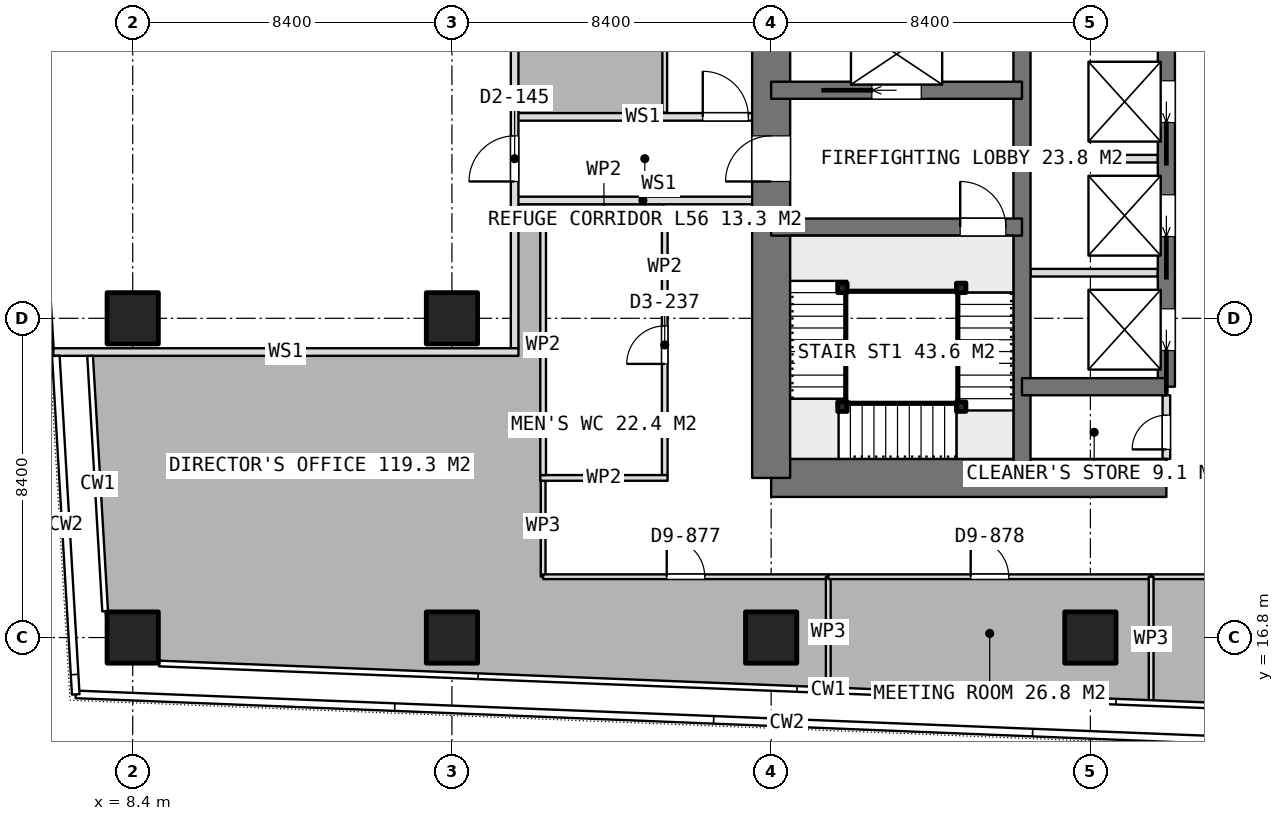
"""IFC4 building model, lengths in metres.
Left out: names, types, materials, properties, quantities, classifications, styles, units other than length and angle.
Written with IfcOpenShell. Run it as: python <this file> out.ifc"""

import sys

from ifc_helpers import new_model, si_unit, direction, frame, frame_2d, origin, origin_2d, place, context, subcontext, project, spatial, rectangle, extrude, element, fill, save


model = new_model("IFC4")
c1 = context("Model", 3, precision=1e-05, world=origin(), true_north=direction((0.0, 1.0)))
c2 = subcontext(c1, "Body", "Model", "MODEL_VIEW")
j1 = project(units=[si_unit("LENGTHUNIT", "METRE"), si_unit("PLANEANGLEUNIT", "RADIAN")], contexts=[c1])
p1 = place(None, origin())
s1 = spatial("IfcSite", under=j1, at=p1, CompositionType="ELEMENT")
p2 = place(p1, origin())
s2 = spatial("IfcBuilding", under=s1, at=p2, CompositionType="ELEMENT")
p3 = place(p2, frame((0.0, 0.0, 221.45)))
s3 = spatial("IfcBuildingStorey", under=s2, at=p3, CompositionType="ELEMENT", Elevation=221.45)
p4 = place(p3, frame((25.2, 21.0, 0.0), z_axis=(0.0, 0.0, 1.0), x_axis=(1.0, 0.0, 0.0)))
e1 = element("IfcWall", 1, at=p4, inside=s3, PredefinedType="SHEAR", context=c2, shape_type="SweptSolid", body=[
    extrude(rectangle(XDim=10.4, YDim=1.0, at=frame_2d((5.2, 0.0))), origin(), (0.0, 0.0, 1.0), 3.75),
])
p5 = place(p3, frame((25.2, 21.0, 0.0), z_axis=(0.0, 0.0, 1.0), x_axis=(0.0, 1.0, 0.0)))
e2 = element("IfcWall", 2, at=p5, inside=s3, PredefinedType="SHEAR", context=c2, shape_type="SweptSolid", body=[
    extrude(rectangle(XDim=25.2, YDim=1.0, at=frame_2d((12.6, 0.0))), origin(), (0.0, 0.0, 1.0), 3.75),
])
p6 = place(p5, frame((7.8, 0.0, 0.0)))
e3 = element("IfcOpeningElement", 3, at=p6, cuts=e2, PredefinedType="OPENING", context=c2, shape_type="SweptSolid", body=[
    extrude(rectangle(XDim=1.2, YDim=2.1, at=frame_2d((0.6, 1.05))), frame((0.0, 0.51, 0.0), z_axis=(0.0, -1.0, 0.0), x_axis=(1.0, 0.0, 0.0)), (0.0, 0.0, 1.0), 1.02),
])
p7 = place(p5, frame((14.25, 0.0, 0.0)))
e4 = element("IfcOpeningElement", 4, at=p7, cuts=e2, PredefinedType="OPENING", context=c2, shape_type="SweptSolid", body=[
    extrude(rectangle(XDim=0.9, YDim=2.1, at=frame_2d((0.45, 1.05))), frame((0.0, 0.51, 0.0), z_axis=(0.0, -1.0, 0.0), x_axis=(1.0, 0.0, 0.0)), (0.0, 0.0, 1.0), 1.02),
])
p8 = place(p5, frame((16.85, 0.0, 0.0)))
e5 = element("IfcOpeningElement", 5, at=p8, cuts=e2, PredefinedType="OPENING", context=c2, shape_type="SweptSolid", body=[
    extrude(rectangle(XDim=0.9, YDim=2.1, at=frame_2d((0.45, 1.05))), frame((0.0, 0.51, 0.0), z_axis=(0.0, -1.0, 0.0), x_axis=(1.0, 0.0, 0.0)), (0.0, 0.0, 1.0), 1.02),
])
p9 = place(p5, frame((19.025, 0.0, 0.0)))
e6 = element("IfcOpeningElement", 6, at=p9, cuts=e2, PredefinedType="OPENING", context=c2, shape_type="SweptSolid", body=[
    extrude(rectangle(XDim=1.2, YDim=2.1, at=frame_2d((0.6, 1.05))), frame((0.0, 0.51, 0.0), z_axis=(0.0, -1.0, 0.0), x_axis=(1.0, 0.0, 0.0)), (0.0, 0.0, 1.0), 1.02),
])
p10 = place(p3, frame((31.8, 21.0, 0.0), z_axis=(0.0, 0.0, 1.0), x_axis=(0.0, 1.0, 0.0)))
e7 = element("IfcWall", 7, at=p10, inside=s3, PredefinedType="SHEAR", context=c2, shape_type="SweptSolid", body=[
    extrude(rectangle(XDim=25.2, YDim=0.45, at=frame_2d((12.6, 0.0))), origin(), (0.0, 0.0, 1.0), 3.75),
])
p11 = place(p3, frame((35.6, 23.4, 0.0), z_axis=(0.0, 0.0, 1.0), x_axis=(0.0, 1.0, 0.0)))
e8 = element("IfcWall", 8, at=p11, inside=s3, PredefinedType="SHEAR", context=c2, shape_type="SweptSolid", body=[
    extrude(rectangle(XDim=18.0, YDim=0.45, at=frame_2d((9.0, 0.0))), origin(), (0.0, 0.0, 1.0), 3.75),
])
p12 = place(p11, frame((0.95, 0.0, 0.0)))
e9 = element("IfcOpeningElement", 9, at=p12, cuts=e8, PredefinedType="OPENING", context=c2, shape_type="SweptSolid", body=[
    extrude(rectangle(XDim=1.1, YDim=2.1, at=frame_2d((0.55, 1.05))), frame((0.0, 0.235, 0.0), z_axis=(0.0, -1.0, 0.0), x_axis=(1.0, 0.0, 0.0)), (0.0, 0.0, 1.0), 0.47),
])
p13 = place(p11, frame((3.95, 0.0, 0.0)))
e10 = element("IfcOpeningElement", 10, at=p13, cuts=e8, PredefinedType="OPENING", context=c2, shape_type="SweptSolid", body=[
    extrude(rectangle(XDim=1.1, YDim=2.1, at=frame_2d((0.55, 1.05))), frame((0.0, 0.235, 0.0), z_axis=(0.0, -1.0, 0.0), x_axis=(1.0, 0.0, 0.0)), (0.0, 0.0, 1.0), 0.47),
])
p14 = place(p11, frame((6.95, 0.0, 0.0)))
e11 = element("IfcOpeningElement", 11, at=p14, cuts=e8, PredefinedType="OPENING", context=c2, shape_type="SweptSolid", body=[
    extrude(rectangle(XDim=1.1, YDim=2.1, at=frame_2d((0.55, 1.05))), frame((0.0, 0.235, 0.0), z_axis=(0.0, -1.0, 0.0), x_axis=(1.0, 0.0, 0.0)), (0.0, 0.0, 1.0), 0.47),
])
p15 = place(p11, frame((9.95, 0.0, 0.0)))
e12 = element("IfcOpeningElement", 12, at=p15, cuts=e8, PredefinedType="OPENING", context=c2, shape_type="SweptSolid", body=[
    extrude(rectangle(XDim=1.1, YDim=2.1, at=frame_2d((0.55, 1.05))), frame((0.0, 0.235, 0.0), z_axis=(0.0, -1.0, 0.0), x_axis=(1.0, 0.0, 0.0)), (0.0, 0.0, 1.0), 0.47),
])
p16 = place(p11, frame((12.95, 0.0, 0.0)))
e13 = element("IfcOpeningElement", 13, at=p16, cuts=e8, PredefinedType="OPENING", context=c2, shape_type="SweptSolid", body=[
    extrude(rectangle(XDim=1.1, YDim=2.1, at=frame_2d((0.55, 1.05))), frame((0.0, 0.235, 0.0), z_axis=(0.0, -1.0, 0.0), x_axis=(1.0, 0.0, 0.0)), (0.0, 0.0, 1.0), 0.47),
])
p17 = place(p11, frame((15.95, 0.0, 0.0)))
e14 = element("IfcOpeningElement", 14, at=p17, cuts=e8, PredefinedType="OPENING", context=c2, shape_type="SweptSolid", body=[
    extrude(rectangle(XDim=1.1, YDim=2.1, at=frame_2d((0.55, 1.05))), frame((0.0, 0.235, 0.0), z_axis=(0.0, -1.0, 0.0), x_axis=(1.0, 0.0, 0.0)), (0.0, 0.0, 1.0), 0.47),
])
p18 = place(p3, frame((31.8, 23.4, 0.0), z_axis=(0.0, 0.0, 1.0), x_axis=(1.0, 0.0, 0.0)))
e15 = element("IfcWall", 15, at=p18, inside=s3, PredefinedType="SHEAR", context=c2, shape_type="SweptSolid", body=[
    extrude(rectangle(XDim=3.8, YDim=0.45, at=frame_2d((1.9, 0.0))), origin(), (0.0, 0.0, 1.0), 3.75),
])
p19 = place(p3, frame((25.2, 27.6, 0.0), z_axis=(0.0, 0.0, 1.0), x_axis=(1.0, 0.0, 0.0)))
e16 = element("IfcWall", 16, at=p19, inside=s3, PredefinedType="SHEAR", context=c2, shape_type="SweptSolid", body=[
    extrude(rectangle(XDim=6.6, YDim=0.45, at=frame_2d((3.3, 0.0))), origin(), (0.0, 0.0, 1.0), 3.75),
])
p20 = place(p19, frame((4.975, 0.0, 0.0)))
e17 = element("IfcOpeningElement", 17, at=p20, cuts=e16, PredefinedType="OPENING", context=c2, shape_type="SweptSolid", body=[
    extrude(rectangle(XDim=1.2, YDim=2.1, at=frame_2d((0.6, 1.05))), frame((0.0, 0.235, 0.0), z_axis=(0.0, -1.0, 0.0), x_axis=(1.0, 0.0, 0.0)), (0.0, 0.0, 1.0), 0.47),
])
p21 = place(p3, frame((25.2, 31.2, 0.0), z_axis=(0.0, 0.0, 1.0), x_axis=(1.0, 0.0, 0.0)))
e18 = element("IfcWall", 18, at=p21, inside=s3, PredefinedType="SHEAR", context=c2, shape_type="SweptSolid", body=[
    extrude(rectangle(XDim=6.6, YDim=0.45, at=frame_2d((3.3, 0.0))), origin(), (0.0, 0.0, 1.0), 3.75),
])
p22 = place(p21, frame((2.65, 0.0, 0.0)))
e19 = element("IfcOpeningElement", 19, at=p22, cuts=e18, PredefinedType="OPENING", context=c2, shape_type="SweptSolid", body=[
    extrude(rectangle(XDim=1.3, YDim=2.1, at=frame_2d((0.65, 1.05))), frame((0.0, 0.235, 0.0), z_axis=(0.0, -1.0, 0.0), x_axis=(1.0, 0.0, 0.0)), (0.0, 0.0, 1.0), 0.47),
])
for number, where, z_axis, x_axis in (
    (20, (8.4, 16.8, 0.0), (0.0, 0.0, 1.0), (1.0, 0.0, 0.0)),
    (21, (8.4, 25.2, 0.0), (0.0, 0.0, 1.0), (1.0, 0.0, 0.0)),
    (22, (16.8, 16.8, 0.0), (0.0, 0.0, 1.0), (1.0, 0.0, 0.0)),
    (23, (16.8, 25.2, 0.0), (0.0, 0.0, 1.0), (1.0, 0.0, 0.0)),
    (24, (25.2, 16.8, 0.0), (0.0, 0.0, 1.0), (1.0, 0.0, 0.0)),
    (25, (33.6, 16.8, 0.0), (0.0, 0.0, 1.0), (1.0, 0.0, 0.0)),
):
    element("IfcColumn", number, at=place(p3, frame(where, z_axis=z_axis, x_axis=x_axis)), inside=s3, PredefinedType="COLUMN", context=c2, shape_type="SweptSolid", body=[
        extrude(rectangle(XDim=1.35, YDim=1.35, at=origin_2d()), origin(), (0.0, 0.0, 1.0), 3.75),
    ])
for number, where, z_axis, x_axis in (
    (26, (32.025, 26.4, 0.0), (0.0, 0.0, 1.0), (1.0, 0.0, 0.0)),
    (27, (32.025, 29.4, 0.0), (0.0, 0.0, 1.0), (1.0, 0.0, 0.0)),
):
    element("IfcWall", number, at=place(p3, frame(where, z_axis=z_axis, x_axis=x_axis)), inside=s3, PredefinedType="PARTITIONING", context=c2, shape_type="SweptSolid", body=[
        extrude(rectangle(XDim=3.35, YDim=0.2, at=frame_2d((1.675, 0.0))), origin(), (0.0, 0.0, 1.0), 3.5),
    ])
p23 = place(p3, frame((35.6, 21.5, 0.0), z_axis=(0.0, 0.0, 1.0), x_axis=(0.0, 1.0, 0.0)))
e28 = element("IfcWall", 28, at=p23, inside=s3, PredefinedType="PARTITIONING", context=c2, shape_type="SweptSolid", body=[
    extrude(rectangle(XDim=1.675, YDim=0.2, at=frame_2d((0.837, 0.0))), origin(), (0.0, 0.0, 1.0), 3.5),
])
p24 = place(p23, frame((0.25, 0.0, 0.0)))
e29 = element("IfcOpeningElement", 29, at=p24, cuts=e28, PredefinedType="OPENING", context=c2, shape_type="SweptSolid", body=[
    extrude(rectangle(XDim=0.9, YDim=2.1, at=frame_2d((0.45, 1.05))), frame((0.0, 0.11, 0.0), z_axis=(0.0, -1.0, 0.0), x_axis=(1.0, 0.0, 0.0)), (0.0, 0.0, 1.0), 0.22),
])
for number, where, z_axis, x_axis in (
    (30, (19.125, 21.0, 0.0), (0.0, 0.0, 1.0), (1.0, 0.0, 0.0)),
    (31, (19.125, 28.0, 0.0), (0.0, 0.0, 1.0), (1.0, 0.0, 0.0)),
):
    element("IfcWall", number, at=place(p3, frame(where, z_axis=z_axis, x_axis=x_axis)), inside=s3, PredefinedType="PARTITIONING", context=c2, shape_type="SweptSolid", body=[
        extrude(rectangle(XDim=3.35, YDim=0.15, at=frame_2d((1.675, 0.0))), origin(), (0.0, 0.0, 1.0), 3.5),
    ])
p25 = place(p3, frame((19.2, 21.075, 0.0), z_axis=(0.0, 0.0, 1.0), x_axis=(0.0, 1.0, 0.0)))
e32 = element("IfcWall", 32, at=p25, inside=s3, PredefinedType="PARTITIONING", context=c2, shape_type="SweptSolid", body=[
    extrude(rectangle(XDim=6.85, YDim=0.15, at=frame_2d((3.425, 0.0))), origin(), (0.0, 0.0, 1.0), 3.5),
])
p26 = place(p3, frame((22.4, 21.075, 0.0), z_axis=(0.0, 0.0, 1.0), x_axis=(0.0, 1.0, 0.0)))
e33 = element("IfcWall", 33, at=p26, inside=s3, PredefinedType="PARTITIONING", context=c2, shape_type="SweptSolid", body=[
    extrude(rectangle(XDim=6.85, YDim=0.15, at=frame_2d((3.425, 0.0))), origin(), (0.0, 0.0, 1.0), 3.5),
])
p27 = place(p26, frame((2.925, 0.0, 0.0)))
e34 = element("IfcOpeningElement", 34, at=p27, cuts=e33, PredefinedType="OPENING", context=c2, shape_type="SweptSolid", body=[
    extrude(rectangle(XDim=1.0, YDim=2.1, at=frame_2d((0.5, 1.05))), frame((0.0, 0.085, 0.0), z_axis=(0.0, -1.0, 0.0), x_axis=(1.0, 0.0, 0.0)), (0.0, 0.0, 1.0), 0.17),
])
p28 = place(p3, frame((35.199, 18.4, 0.0), z_axis=(0.0, 0.0, 1.0), x_axis=(1.0, 0.0, 0.0)))
e35 = element("IfcWall", 35, at=p28, inside=s3, PredefinedType="PARTITIONING", context=c2, shape_type="SweptSolid", body=[
    extrude(rectangle(XDim=15.21, YDim=0.125, at=frame_2d((7.605, 0.0))), origin(), (0.0, 0.0, 1.0), 3.5),
])
p29 = place(p28, frame((7.605, 0.0, 0.0)))
e36 = element("IfcOpeningElement", 36, at=p29, cuts=e35, PredefinedType="OPENING", context=c2, shape_type="SweptSolid", body=[
    extrude(rectangle(XDim=1.8, YDim=2.1, at=frame_2d((0.9, 1.05))), frame((0.0, 0.073, 0.0), z_axis=(0.0, -1.0, 0.0), x_axis=(1.0, 0.0, 0.0)), (0.0, 0.0, 1.0), 0.145),
])
p30 = place(p3, frame((35.199, 15.126, 0.0), z_axis=(0.0, 0.0, 1.0), x_axis=(0.0, 1.0, 0.0)))
e37 = element("IfcWall", 37, at=p30, inside=s3, PredefinedType="PARTITIONING", context=c2, shape_type="SweptSolid", body=[
    extrude(rectangle(XDim=3.274, YDim=0.125, at=frame_2d((1.637, 0.0))), origin(), (0.0, 0.0, 1.0), 3.5),
])
p31 = place(p3, frame((19.2, 21.075, 0.0), z_axis=(0.0, 0.0, 1.0), x_axis=(0.0, -1.0, 0.0)))
e38 = element("IfcWall", 38, at=p31, inside=s3, PredefinedType="PARTITIONING", context=c2, shape_type="SweptSolid", body=[
    extrude(rectangle(XDim=2.675, YDim=0.125, at=frame_2d((1.337, 0.0))), origin(), (0.0, 0.0, 1.0), 3.5),
])
p32 = place(p3, frame((19.2, 18.4, 0.0), z_axis=(0.0, 0.0, 1.0), x_axis=(1.0, 0.0, 0.0)))
e39 = element("IfcWall", 39, at=p32, inside=s3, PredefinedType="PARTITIONING", context=c2, shape_type="SweptSolid", body=[
    extrude(rectangle(XDim=7.503, YDim=0.125, at=frame_2d((3.751, 0.0))), origin(), (0.0, 0.0, 1.0), 3.5),
])
p33 = place(p32, frame((3.252, 0.0, 0.0)))
e40 = element("IfcOpeningElement", 40, at=p33, cuts=e39, PredefinedType="OPENING", context=c2, shape_type="SweptSolid", body=[
    extrude(rectangle(XDim=1.0, YDim=2.1, at=frame_2d((0.5, 1.05))), frame((0.0, 0.073, 0.0), z_axis=(0.0, -1.0, 0.0), x_axis=(1.0, 0.0, 0.0)), (0.0, 0.0, 1.0), 0.145),
])
p34 = place(p3, frame((26.703, 18.4, 0.0), z_axis=(0.0, 0.0, 1.0), x_axis=(0.0, -1.0, 0.0)))
e41 = element("IfcWall", 41, at=p34, inside=s3, PredefinedType="PARTITIONING", context=c2, shape_type="SweptSolid", body=[
    extrude(rectangle(XDim=2.905, YDim=0.125, at=frame_2d((1.452, 0.0))), origin(), (0.0, 0.0, 1.0), 3.5),
])
p35 = place(p3, frame((26.704, 18.4, 0.0), z_axis=(0.0, 0.0, 1.0), x_axis=(1.0, 0.0, 0.0)))
e42 = element("IfcWall", 42, at=p35, inside=s3, PredefinedType="PARTITIONING", context=c2, shape_type="SweptSolid", body=[
    extrude(rectangle(XDim=8.494, YDim=0.125, at=frame_2d((4.247, 0.0))), origin(), (0.0, 0.0, 1.0), 3.5),
])
p36 = place(p35, frame((3.747, 0.0, 0.0)))
e43 = element("IfcOpeningElement", 43, at=p36, cuts=e42, PredefinedType="OPENING", context=c2, shape_type="SweptSolid", body=[
    extrude(rectangle(XDim=1.0, YDim=2.1, at=frame_2d((0.5, 1.05))), frame((0.0, 0.073, 0.0), z_axis=(0.0, -1.0, 0.0), x_axis=(1.0, 0.0, 0.0)), (0.0, 0.0, 1.0), 0.145),
])
p37 = place(p3, frame((22.4, 42.46, 0.0), z_axis=(0.0, 0.0, 1.0), x_axis=(0.0, -1.0, 0.0)))
e44 = element("IfcWall", 44, at=p37, inside=s3, PredefinedType="PARTITIONING", context=c2, shape_type="SweptSolid", body=[
    extrude(rectangle(XDim=11.849, YDim=0.125, at=frame_2d((5.924, 0.0))), origin(), (0.0, 0.0, 1.0), 3.5),
])
p38 = place(p37, frame((4.955, 0.0, 0.0)))
e45 = element("IfcOpeningElement", 45, at=p38, cuts=e44, PredefinedType="OPENING", context=c2, shape_type="SweptSolid", body=[
    extrude(rectangle(XDim=1.8, YDim=2.1, at=frame_2d((0.9, 1.05))), frame((0.0, 0.073, 0.0), z_axis=(0.0, -1.0, 0.0), x_axis=(1.0, 0.0, 0.0)), (0.0, 0.0, 1.0), 0.145),
])
for number, where, z_axis, x_axis in (
    (46, (30.2, 26.0, 0.0), (0.0, 0.0, 1.0), (1.0, 0.0, 0.0)),
    (47, (30.2, 22.875, 0.0), (0.0, 0.0, 1.0), (1.0, 0.0, 0.0)),
    (48, (27.075, 22.875, 0.0), (0.0, 0.0, 1.0), (1.0, 0.0, 0.0)),
    (49, (27.075, 26.0, 0.0), (0.0, 0.0, 1.0), (1.0, 0.0, 0.0)),
):
    element("IfcColumn", number, at=place(p3, frame(where, z_axis=z_axis, x_axis=x_axis)), inside=s3, PredefinedType="COLUMN", context=c2, shape_type="SweptSolid", body=[
        extrude(rectangle(XDim=0.25, YDim=0.25, at=origin_2d()), origin(), (0.0, 0.0, 1.0), 3.75),
    ])
p39 = place(p3, frame((18.45, 24.412, 0.0), z_axis=(0.0, 0.0, 1.0), x_axis=(0.0, 1.0, 0.0)))
e50 = element("IfcWall", 50, at=p39, inside=s3, PredefinedType="PARTITIONING", context=c2, shape_type="SweptSolid", body=[
    extrude(rectangle(XDim=17.816, YDim=0.2, at=frame_2d((8.908, 0.0))), origin(), (0.0, 0.0, 1.0), 3.5),
])
p40 = place(p39, frame((4.388, 0.0, 0.0)))
e51 = element("IfcOpeningElement", 51, at=p40, cuts=e50, PredefinedType="OPENING", context=c2, shape_type="SweptSolid", body=[
    extrude(rectangle(XDim=1.2, YDim=2.1, at=frame_2d((0.6, 1.05))), frame((0.0, 0.11, 0.0), z_axis=(0.0, -1.0, 0.0), x_axis=(1.0, 0.0, 0.0)), (0.0, 0.0, 1.0), 0.22),
])
p41 = place(p3, frame((6.311, 24.312, 0.0), z_axis=(0.0, 0.0, 1.0), x_axis=(1.0, 0.0, 0.0)))
e52 = element("IfcWall", 52, at=p41, inside=s3, PredefinedType="PARTITIONING", context=c2, shape_type="SweptSolid", body=[
    extrude(rectangle(XDim=12.239, YDim=0.2, at=frame_2d((6.12, 0.0))), origin(), (0.0, 0.0, 1.0), 3.5),
])
p42 = place(p3, frame((18.45, 30.5, 0.0), z_axis=(0.0, 0.0, 1.0), x_axis=(1.0, 0.0, 0.0)))
e53 = element("IfcWall", 53, at=p42, inside=s3, PredefinedType="PARTITIONING", context=c2, shape_type="SweptSolid", body=[
    extrude(rectangle(XDim=6.75, YDim=0.2, at=frame_2d((3.375, 0.0))), origin(), (0.0, 0.0, 1.0), 3.5),
])
p43 = place(p42, frame((4.95, 0.0, 0.0)))
e54 = element("IfcOpeningElement", 54, at=p43, cuts=e53, PredefinedType="OPENING", context=c2, shape_type="SweptSolid", body=[
    extrude(rectangle(XDim=1.2, YDim=2.1, at=frame_2d((0.6, 1.05))), frame((0.0, 0.11, 0.0), z_axis=(0.0, -1.0, 0.0), x_axis=(1.0, 0.0, 0.0)), (0.0, 0.0, 1.0), 0.22),
])
p44 = place(p3, frame((18.45, 28.3, 0.0), z_axis=(0.0, 0.0, 1.0), x_axis=(1.0, 0.0, 0.0)))
e55 = element("IfcWall", 55, at=p44, inside=s3, PredefinedType="PARTITIONING", context=c2, shape_type="SweptSolid", body=[
    extrude(rectangle(XDim=6.75, YDim=0.2, at=frame_2d((3.375, 0.0))), origin(), (0.0, 0.0, 1.0), 3.5),
])
p45 = place(p6, origin())
e56 = element("IfcDoor", 56, at=p45, inside=s3, OperationType="SINGLE_SWING_LEFT", PredefinedType="DOOR", context=c2, shape_type="SweptSolid", body=[
    extrude(rectangle(XDim=1.2, YDim=2.1, at=frame_2d((0.6, 1.05))), frame((0.0, 0.025, 0.0), z_axis=(0.0, -1.0, 0.0), x_axis=(1.0, 0.0, 0.0)), (0.0, 0.0, 1.0), 0.05),
])
fill(e3, e56)
p46 = place(p24, origin())
e57 = element("IfcDoor", 57, at=p46, inside=s3, OperationType="SINGLE_SWING_LEFT", PredefinedType="DOOR", context=c2, shape_type="SweptSolid", body=[
    extrude(rectangle(XDim=0.9, YDim=2.1, at=frame_2d((0.45, 1.05))), frame((0.0, 0.025, 0.0), z_axis=(0.0, -1.0, 0.0), x_axis=(1.0, 0.0, 0.0)), (0.0, 0.0, 1.0), 0.05),
])
fill(e29, e57)
p47 = place(p12, origin())
e58 = element("IfcDoor", 58, at=p47, inside=s3, OperationType="SLIDING_TO_LEFT", PredefinedType="USERDEFINED", context=c2, shape_type="SweptSolid", body=[
    extrude(rectangle(XDim=1.1, YDim=2.1, at=frame_2d((0.55, 1.05))), frame((0.0, 0.025, 0.0), z_axis=(0.0, -1.0, 0.0), x_axis=(1.0, 0.0, 0.0)), (0.0, 0.0, 1.0), 0.05),
])
fill(e9, e58)
p48 = place(p13, origin())
e59 = element("IfcDoor", 59, at=p48, inside=s3, OperationType="SLIDING_TO_LEFT", PredefinedType="USERDEFINED", context=c2, shape_type="SweptSolid", body=[
    extrude(rectangle(XDim=1.1, YDim=2.1, at=frame_2d((0.55, 1.05))), frame((0.0, 0.025, 0.0), z_axis=(0.0, -1.0, 0.0), x_axis=(1.0, 0.0, 0.0)), (0.0, 0.0, 1.0), 0.05),
])
fill(e10, e59)
p49 = place(p14, origin())
e60 = element("IfcDoor", 60, at=p49, inside=s3, OperationType="SLIDING_TO_LEFT", PredefinedType="USERDEFINED", context=c2, shape_type="SweptSolid", body=[
    extrude(rectangle(XDim=1.1, YDim=2.1, at=frame_2d((0.55, 1.05))), frame((0.0, 0.025, 0.0), z_axis=(0.0, -1.0, 0.0), x_axis=(1.0, 0.0, 0.0)), (0.0, 0.0, 1.0), 0.05),
])
fill(e11, e60)
p50 = place(p22, origin())
e61 = element("IfcDoor", 61, at=p50, inside=s3, OperationType="SLIDING_TO_LEFT", PredefinedType="USERDEFINED", context=c2, shape_type="SweptSolid", body=[
    extrude(rectangle(XDim=1.3, YDim=2.1, at=frame_2d((0.65, 1.05))), frame((0.0, 0.025, 0.0), z_axis=(0.0, -1.0, 0.0), x_axis=(1.0, 0.0, 0.0)), (0.0, 0.0, 1.0), 0.05),
])
fill(e19, e61)
p51 = place(p27, origin())
e62 = element("IfcDoor", 62, at=p51, inside=s3, OperationType="SINGLE_SWING_LEFT", PredefinedType="DOOR", context=c2, shape_type="SweptSolid", body=[
    extrude(rectangle(XDim=1.0, YDim=2.1, at=frame_2d((0.5, 1.05))), frame((0.0, 0.025, 0.0), z_axis=(0.0, -1.0, 0.0), x_axis=(1.0, 0.0, 0.0)), (0.0, 0.0, 1.0), 0.05),
])
fill(e34, e62)
p52 = place(p33, origin())
e63 = element("IfcDoor", 63, at=p52, inside=s3, OperationType="SINGLE_SWING_LEFT", PredefinedType="DOOR", context=c2, shape_type="SweptSolid", body=[
    extrude(rectangle(XDim=1.0, YDim=2.1, at=frame_2d((0.5, 1.05))), frame((0.0, 0.025, 0.0), z_axis=(0.0, -1.0, 0.0), x_axis=(1.0, 0.0, 0.0)), (0.0, 0.0, 1.0), 0.05),
])
fill(e40, e63)
p53 = place(p36, origin())
e64 = element("IfcDoor", 64, at=p53, inside=s3, OperationType="SINGLE_SWING_LEFT", PredefinedType="DOOR", context=c2, shape_type="SweptSolid", body=[
    extrude(rectangle(XDim=1.0, YDim=2.1, at=frame_2d((0.5, 1.05))), frame((0.0, 0.025, 0.0), z_axis=(0.0, -1.0, 0.0), x_axis=(1.0, 0.0, 0.0)), (0.0, 0.0, 1.0), 0.05),
])
fill(e43, e64)
p54 = place(p20, origin())
e65 = element("IfcDoor", 65, at=p54, inside=s3, OperationType="SINGLE_SWING_RIGHT", PredefinedType="DOOR", context=c2, shape_type="SweptSolid", body=[
    extrude(rectangle(XDim=1.2, YDim=2.1, at=frame_2d((0.6, 1.05))), frame((0.0, 0.025, 0.0), z_axis=(0.0, -1.0, 0.0), x_axis=(1.0, 0.0, 0.0)), (0.0, 0.0, 1.0), 0.05),
])
fill(e17, e65)
p55 = place(p40, origin())
e66 = element("IfcDoor", 66, at=p55, inside=s3, OperationType="SINGLE_SWING_LEFT", PredefinedType="DOOR", context=c2, shape_type="SweptSolid", body=[
    extrude(rectangle(XDim=1.2, YDim=2.1, at=frame_2d((0.6, 1.05))), frame((0.0, 0.025, 0.0), z_axis=(0.0, -1.0, 0.0), x_axis=(1.0, 0.0, 0.0)), (0.0, 0.0, 1.0), 0.05),
])
fill(e51, e66)
p56 = place(p43, origin())
e67 = element("IfcDoor", 67, at=p56, inside=s3, OperationType="SINGLE_SWING_LEFT", PredefinedType="DOOR", context=c2, shape_type="SweptSolid", body=[
    extrude(rectangle(XDim=1.2, YDim=2.1, at=frame_2d((0.6, 1.05))), frame((0.0, 0.025, 0.0), z_axis=(0.0, -1.0, 0.0), x_axis=(1.0, 0.0, 0.0)), (0.0, 0.0, 1.0), 0.05),
])
fill(e54, e67)
save(model, sys.argv[1])
